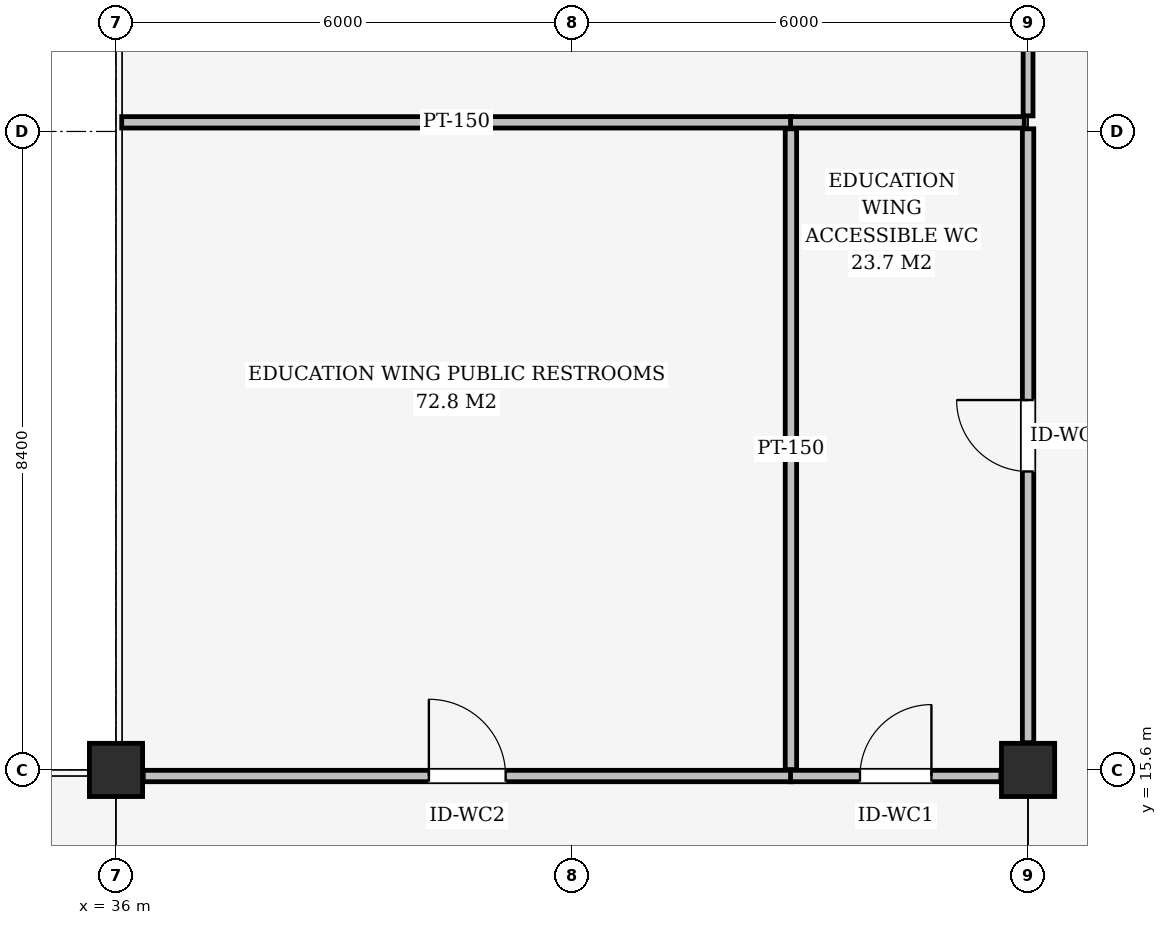
"""IFC4 building model, lengths in metres.
Left out: names, types, materials, properties, quantities, classifications, styles, units other than length and angle.
Written with IfcOpenShell. Run it as: python <this file> out.ifc"""

import sys

from ifc_helpers import new_model, si_unit, direction, frame, frame_2d, origin, origin_2d, place, context, subcontext, project, spatial, rectangle, extrude, element, fill, save


model = new_model("IFC4")
c1 = context("Model", 3, precision=1e-05, world=origin(), true_north=direction((0.0, 1.0)))
c2 = subcontext(c1, "Body", "Model", "MODEL_VIEW")
j1 = project(units=[si_unit("LENGTHUNIT", "METRE"), si_unit("PLANEANGLEUNIT", "RADIAN")], contexts=[c1])
p1 = place(None, origin())
s1 = spatial("IfcSite", under=j1, at=p1, CompositionType="ELEMENT")
p2 = place(p1, origin())
s2 = spatial("IfcBuilding", under=s1, at=p2, CompositionType="ELEMENT")
p3 = place(p2, frame((0.0, 0.0, 4.8)))
s3 = spatial("IfcBuildingStorey", under=s2, at=p3, CompositionType="ELEMENT", Elevation=4.8)
for number, where, z_axis, x_axis in (
    (1, (36.0, 15.6, 0.0), (0.0, 0.0, 1.0), (1.0, 0.0, 0.0)),
    (2, (48.0, 15.6, 0.0), (0.0, 0.0, 1.0), (1.0, 0.0, 0.0)),
):
    element("IfcColumn", number, at=place(p3, frame(where, z_axis=z_axis, x_axis=x_axis)), inside=s3, PredefinedType="COLUMN", context=c2, shape_type="SweptSolid", body=[
        extrude(rectangle(XDim=0.7, YDim=0.7, at=origin_2d()), origin(), (0.0, 0.0, 1.0), 4.5),
    ])
p4 = place(p3, frame((36.358, 15.52, 0.0), z_axis=(0.0, 0.0, 1.0), x_axis=(1.0, 0.0, 0.0)))
e3 = element("IfcWall", 3, at=p4, inside=s3, PredefinedType="PARTITIONING", context=c2, shape_type="SweptSolid", body=[
    extrude(rectangle(XDim=8.527, YDim=0.15, at=frame_2d((4.264, 0.0))), origin(), (0.0, 0.0, 1.0), 3.623),
])
p5 = place(p4, frame((3.759, 0.0, 0.0)))
e4 = element("IfcOpeningElement", 4, at=p5, cuts=e3, PredefinedType="OPENING", context=c2, shape_type="SweptSolid", body=[
    extrude(rectangle(XDim=1.01, YDim=2.1, at=frame_2d((0.505, 1.05))), frame((0.0, 0.085, 0.0), z_axis=(0.0, -1.0, 0.0), x_axis=(1.0, 0.0, 0.0)), (0.0, 0.0, 1.0), 0.17),
])
p6 = place(p3, frame((44.875, 15.52, 0.0), z_axis=(0.0, 0.0, 1.0), x_axis=(1.0, 0.0, 0.0)))
e5 = element("IfcWall", 5, at=p6, inside=s3, PredefinedType="PARTITIONING", context=c2, shape_type="SweptSolid", body=[
    extrude(rectangle(XDim=2.767, YDim=0.15, at=frame_2d((1.384, 0.0))), origin(), (0.0, 0.0, 1.0), 3.623),
])
p7 = place(p6, frame((0.914, 0.0, 0.0)))
e6 = element("IfcOpeningElement", 6, at=p7, cuts=e5, PredefinedType="OPENING", context=c2, shape_type="SweptSolid", body=[
    extrude(rectangle(XDim=0.94, YDim=2.1, at=frame_2d((0.47, 1.05))), frame((0.0, 0.085, 0.0), z_axis=(0.0, -1.0, 0.0), x_axis=(1.0, 0.0, 0.0)), (0.0, 0.0, 1.0), 0.17),
])
p8 = place(p3, frame((36.075, 24.12, 0.0), z_axis=(0.0, 0.0, 1.0), x_axis=(1.0, 0.0, 0.0)))
e7 = element("IfcWall", 7, at=p8, inside=s3, PredefinedType="PARTITIONING", context=c2, shape_type="SweptSolid", body=[
    extrude(rectangle(XDim=8.81, YDim=0.15, at=frame_2d((4.405, 0.0))), origin(), (0.0, 0.0, 1.0), 4.23),
])
p9 = place(p3, frame((44.875, 24.12, 0.0), z_axis=(0.0, 0.0, 1.0), x_axis=(1.0, 0.0, 0.0)))
e8 = element("IfcWall", 8, at=p9, inside=s3, PredefinedType="PARTITIONING", context=c2, shape_type="SweptSolid", body=[
    extrude(rectangle(XDim=3.075, YDim=0.15, at=frame_2d((1.538, 0.0))), origin(), (0.0, 0.0, 1.0), 4.23),
])
p10 = place(p3, frame((48.0, 24.205, 0.0), z_axis=(0.0, 0.0, 1.0), x_axis=(0.0, 1.0, 0.0)))
e9 = element("IfcWall", 9, at=p10, inside=s3, PredefinedType="PARTITIONING", context=c2, shape_type="SweptSolid", body=[
    extrude(rectangle(XDim=5.437, YDim=0.13, at=frame_2d((2.719, 0.0))), origin(), (0.0, 0.0, 1.0), 3.619),
])
p11 = place(p3, frame((44.88, 15.605, 0.0), z_axis=(0.0, 0.0, 1.0), x_axis=(0.0, 1.0, 0.0)))
e10 = element("IfcWall", 10, at=p11, inside=s3, PredefinedType="PARTITIONING", context=c2, shape_type="SweptSolid", body=[
    extrude(rectangle(XDim=8.43, YDim=0.15, at=frame_2d((4.215, 0.0))), origin(), (0.0, 0.0, 1.0), 3.768),
])
p12 = place(p3, frame((48.0, 15.958, 0.0), z_axis=(0.0, 0.0, 1.0), x_axis=(0.0, 1.0, 0.0)))
e11 = element("IfcWall", 11, at=p12, inside=s3, PredefinedType="PARTITIONING", context=c2, shape_type="SweptSolid", body=[
    extrude(rectangle(XDim=8.077, YDim=0.15, at=frame_2d((4.039, 0.0))), origin(), (0.0, 0.0, 1.0), 3.619),
])
p13 = place(p12, frame((3.569, 0.0, 0.0)))
e12 = element("IfcOpeningElement", 12, at=p13, cuts=e11, PredefinedType="OPENING", context=c2, shape_type="SweptSolid", body=[
    extrude(rectangle(XDim=0.94, YDim=2.1, at=frame_2d((0.47, 1.05))), frame((0.0, 0.085, 0.0), z_axis=(0.0, -1.0, 0.0), x_axis=(1.0, 0.0, 0.0)), (0.0, 0.0, 1.0), 0.17),
])
p14 = place(p5, origin())
e13 = element("IfcDoor", 13, at=p14, inside=s3, OperationType="SINGLE_SWING_LEFT", PredefinedType="DOOR", context=c2, shape_type="SweptSolid", body=[
    extrude(rectangle(XDim=1.01, YDim=2.1, at=frame_2d((0.505, 1.05))), frame((0.0, 0.025, 0.0), z_axis=(0.0, -1.0, 0.0), x_axis=(1.0, 0.0, 0.0)), (0.0, 0.0, 1.0), 0.05),
])
fill(e4, e13)
p15 = place(p7, origin())
e14 = element("IfcDoor", 14, at=p15, inside=s3, OperationType="SINGLE_SWING_RIGHT", PredefinedType="DOOR", context=c2, shape_type="SweptSolid", body=[
    extrude(rectangle(XDim=0.94, YDim=2.1, at=frame_2d((0.47, 1.05))), frame((0.0, 0.025, 0.0), z_axis=(0.0, -1.0, 0.0), x_axis=(1.0, 0.0, 0.0)), (0.0, 0.0, 1.0), 0.05),
])
fill(e6, e14)
p16 = place(p13, origin())
e15 = element("IfcDoor", 15, at=p16, inside=s3, OperationType="SINGLE_SWING_RIGHT", PredefinedType="DOOR", context=c2, shape_type="SweptSolid", body=[
    extrude(rectangle(XDim=0.94, YDim=2.1, at=frame_2d((0.47, 1.05))), frame((0.0, 0.025, 0.0), z_axis=(0.0, -1.0, 0.0), x_axis=(1.0, 0.0, 0.0)), (0.0, 0.0, 1.0), 0.05),
])
fill(e12, e15)
save(model, sys.argv[1])
